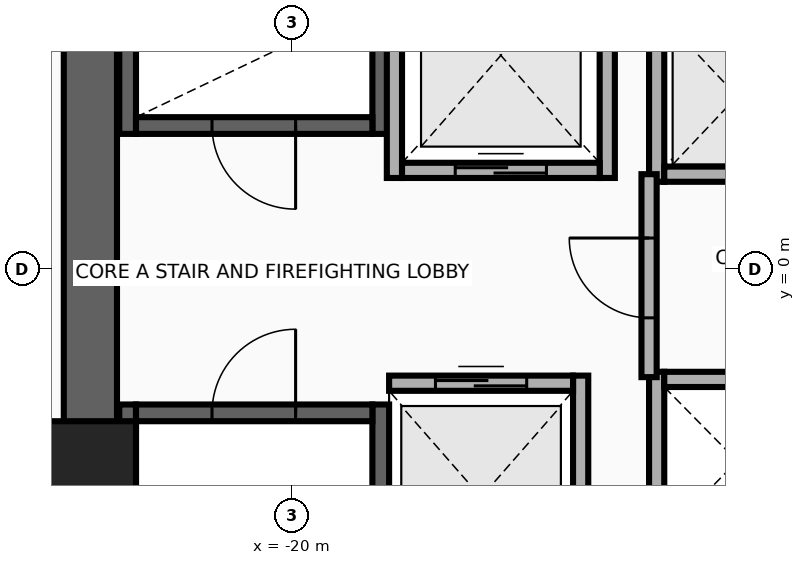
"""IFC4 building model, lengths in metres.
Left out: names, types, materials, properties, quantities, classifications, styles, units other than length and angle.
Written with IfcOpenShell. Run it as: python <this file> out.ifc"""

import sys

from ifc_helpers import new_model, si_unit, direction, frame, frame_2d, origin, origin_2d, place, context, subcontext, project, spatial, rectangle, extrude, source, transform, mapped, element, fill, save


model = new_model("IFC4")
c1 = context("Model", 3, precision=1e-05, world=origin(), true_north=direction((0.0, 1.0)))
c2 = subcontext(c1, "Body", "Model", "MODEL_VIEW")
j1 = project(units=[si_unit("LENGTHUNIT", "METRE"), si_unit("PLANEANGLEUNIT", "RADIAN")], contexts=[c1])
p1 = place(None, origin())
s1 = spatial("IfcSite", under=j1, at=p1, CompositionType="ELEMENT")
p2 = place(p1, origin())
s2 = spatial("IfcBuilding", under=s1, at=p2, CompositionType="ELEMENT")
p3 = place(p2, frame((0.0, 0.0, 127.9)))
s3 = spatial("IfcBuildingStorey", under=s2, at=p3, CompositionType="ELEMENT", Elevation=127.9)
for number, where, z_axis, x_axis in (
    (1, (-22.16, 1.78, 0.0), (0.0, 0.0, 1.0), (0.0, 1.0, 0.0)),
    (2, (-18.83, 1.78, 0.0), (0.0, 0.0, 1.0), (0.0, 1.0, 0.0)),
):
    element("IfcWall", number, at=place(p3, frame(where, z_axis=z_axis, x_axis=x_axis)), inside=s3, PredefinedType="SHEAR", context=c2, shape_type="SweptSolid", body=[
        extrude(rectangle(XDim=8.67, YDim=0.22, at=frame_2d((4.335, 0.0))), origin(), (0.0, 0.0, 1.0), 3.46),
    ])
p4 = place(p3, frame((-22.05, 1.89, 0.0), z_axis=(0.0, 0.0, 1.0), x_axis=(1.0, 0.0, 0.0)))
e3 = element("IfcWall", 3, at=p4, inside=s3, PredefinedType="SHEAR", context=c2, shape_type="SweptSolid", body=[
    extrude(rectangle(XDim=3.11, YDim=0.22, at=frame_2d((1.555, 0.0))), origin(), (0.0, 0.0, 1.0), 3.46),
])
p5 = place(p4, frame((1.0, 0.0, 0.0)))
e4 = element("IfcOpeningElement", 4, at=p5, cuts=e3, PredefinedType="OPENING", context=c2, shape_type="SweptSolid", body=[
    extrude(rectangle(XDim=1.1, YDim=2.15, at=frame_2d((0.55, 1.075))), frame((0.0, 0.125, 0.0), z_axis=(0.0, -1.0, 0.0), x_axis=(1.0, 0.0, 0.0)), (0.0, 0.0, 1.0), 0.25),
])
for number, where, z_axis, x_axis in (
    (5, (-22.16, -10.45, 0.0), (0.0, 0.0, 1.0), (0.0, 1.0, 0.0)),
    (6, (-18.83, -10.45, 0.0), (0.0, 0.0, 1.0), (0.0, 1.0, 0.0)),
):
    element("IfcWall", number, at=place(p3, frame(where, z_axis=z_axis, x_axis=x_axis)), inside=s3, PredefinedType="SHEAR", context=c2, shape_type="SweptSolid", body=[
        extrude(rectangle(XDim=8.67, YDim=0.22, at=frame_2d((4.335, 0.0))), origin(), (0.0, 0.0, 1.0), 3.46),
    ])
p6 = place(p3, frame((-22.05, -1.89, 0.0), z_axis=(0.0, 0.0, 1.0), x_axis=(1.0, 0.0, 0.0)))
e7 = element("IfcWall", 7, at=p6, inside=s3, PredefinedType="SHEAR", context=c2, shape_type="SweptSolid", body=[
    extrude(rectangle(XDim=3.11, YDim=0.22, at=frame_2d((1.555, 0.0))), origin(), (0.0, 0.0, 1.0), 3.46),
])
p7 = place(p6, frame((1.0, 0.0, 0.0)))
e8 = element("IfcOpeningElement", 8, at=p7, cuts=e7, PredefinedType="OPENING", context=c2, shape_type="SweptSolid", body=[
    extrude(rectangle(XDim=1.1, YDim=2.15, at=frame_2d((0.55, 1.075))), frame((0.0, 0.125, 0.0), z_axis=(0.0, -1.0, 0.0), x_axis=(1.0, 0.0, 0.0)), (0.0, 0.0, 1.0), 0.25),
])
p8 = place(p3, frame((-22.65, -11.15, 0.0), z_axis=(0.0, 0.0, 1.0), x_axis=(0.0, 1.0, 0.0)))
e9 = element("IfcWall", 9, at=p8, inside=s3, PredefinedType="SHEAR", context=c2, shape_type="SweptSolid", body=[
    extrude(rectangle(XDim=22.3, YDim=0.7, at=frame_2d((11.15, 0.0))), origin(), (0.0, 0.0, 1.0), 3.46),
])
m1 = source(origin(), c2, "Body", "SweptSolid", [
    extrude(rectangle(XDim=1.2, YDim=1.2, at=origin_2d()), origin(), (0.0, 0.0, 1.0), 3.7),
])
p9 = place(p3, frame((-22.65, -2.6, 0.0), z_axis=(0.0, 0.0, 1.0), x_axis=(1.0, 0.0, 0.0)))
e10 = element("IfcColumn", 10, at=p9, inside=s3, PredefinedType="COLUMN", context=c2, shape_type="MappedRepresentation", body=[
    mapped(m1, transform((0.0, 0.0, 0.0), x_axis=(1.0, 0.0, 0.0), y_axis=(0.0, 1.0, 0.0), z_axis=(0.0, 0.0, 1.0), scale=1.0)),
])
for number, where, z_axis, x_axis in (
    (11, (-18.65, 1.2, 0.0), (0.0, 0.0, 1.0), (0.0, 1.0, 0.0)),
    (12, (-15.85, 1.2, 0.0), (0.0, 0.0, 1.0), (0.0, 1.0, 0.0)),
):
    element("IfcWall", number, at=place(p3, frame(where, z_axis=z_axis, x_axis=x_axis)), inside=s3, PredefinedType="MOVABLE", context=c2, shape_type="SweptSolid", body=[
        extrude(rectangle(XDim=3.225, YDim=0.2, at=frame_2d((1.613, 0.0))), origin(), (0.0, 0.0, 1.0), 3.46),
    ])
p10 = place(p3, frame((-18.55, 1.3, 0.0), z_axis=(0.0, 0.0, 1.0), x_axis=(1.0, 0.0, 0.0)))
e13 = element("IfcWall", 13, at=p10, inside=s3, PredefinedType="MOVABLE", context=c2, shape_type="SweptSolid", body=[
    extrude(rectangle(XDim=2.6, YDim=0.2, at=frame_2d((1.3, 0.0))), origin(), (0.0, 0.0, 1.0), 3.46),
])
p11 = place(p10, frame((0.7, 0.0, 0.0)))
e14 = element("IfcOpeningElement", 14, at=p11, cuts=e13, PredefinedType="OPENING", context=c2, shape_type="SweptSolid", body=[
    extrude(rectangle(XDim=1.2, YDim=2.1, at=frame_2d((0.6, 1.05))), frame((0.0, 0.115, 0.0), z_axis=(0.0, -1.0, 0.0), x_axis=(1.0, 0.0, 0.0)), (0.0, 0.0, 1.0), 0.23),
])
p12 = place(p3, frame((-16.2, -4.6, 0.0), z_axis=(0.0, 0.0, 1.0), x_axis=(0.0, 1.0, 0.0)))
e15 = element("IfcWall", 15, at=p12, inside=s3, PredefinedType="MOVABLE", context=c2, shape_type="SweptSolid", body=[
    extrude(rectangle(XDim=3.2, YDim=0.2, at=frame_2d((1.6, 0.0))), origin(), (0.0, 0.0, 1.0), 3.46),
])
p13 = place(p3, frame((-18.72, -1.5, 0.0), z_axis=(0.0, 0.0, 1.0), x_axis=(1.0, 0.0, 0.0)))
e16 = element("IfcWall", 16, at=p13, inside=s3, PredefinedType="MOVABLE", context=c2, shape_type="SweptSolid", body=[
    extrude(rectangle(XDim=2.42, YDim=0.2, at=frame_2d((1.21, 0.0))), origin(), (0.0, 0.0, 1.0), 3.46),
])
p14 = place(p13, frame((0.61, 0.0, 0.0)))
e17 = element("IfcOpeningElement", 17, at=p14, cuts=e16, PredefinedType="OPENING", context=c2, shape_type="SweptSolid", body=[
    extrude(rectangle(XDim=1.2, YDim=2.1, at=frame_2d((0.6, 1.05))), frame((0.0, 0.115, 0.0), z_axis=(0.0, -1.0, 0.0), x_axis=(1.0, 0.0, 0.0)), (0.0, 0.0, 1.0), 0.23),
])
p15 = place(p3, frame((-15.2, 1.15, 0.0), z_axis=(0.0, 0.0, 1.0), x_axis=(0.0, 1.0, 0.0)))
e18 = element("IfcWall", 18, at=p15, inside=s3, PredefinedType="MOVABLE", context=c2, shape_type="SweptSolid", body=[
    extrude(rectangle(XDim=2.25, YDim=0.2, at=frame_2d((1.125, 0.0))), origin(), (0.0, 0.0, 1.0), 3.46),
])
p16 = place(p3, frame((-15.1, 1.25, 0.0), z_axis=(0.0, 0.0, 1.0), x_axis=(1.0, 0.0, 0.0)))
e19 = element("IfcWall", 19, at=p16, inside=s3, PredefinedType="MOVABLE", context=c2, shape_type="SweptSolid", body=[
    extrude(rectangle(XDim=1.92, YDim=0.2, at=frame_2d((0.96, 0.0))), origin(), (0.0, 0.0, 1.0), 3.46),
])
p17 = place(p3, frame((-15.2, -3.7, 0.0), z_axis=(0.0, 0.0, 1.0), x_axis=(0.0, 1.0, 0.0)))
e20 = element("IfcWall", 20, at=p17, inside=s3, PredefinedType="MOVABLE", context=c2, shape_type="SweptSolid", body=[
    extrude(rectangle(XDim=2.35, YDim=0.2, at=frame_2d((1.175, 0.0))), origin(), (0.0, 0.0, 1.0), 3.46),
])
p18 = place(p3, frame((-15.1, -1.45, 0.0), z_axis=(0.0, 0.0, 1.0), x_axis=(1.0, 0.0, 0.0)))
e21 = element("IfcWall", 21, at=p18, inside=s3, PredefinedType="MOVABLE", context=c2, shape_type="SweptSolid", body=[
    extrude(rectangle(XDim=1.92, YDim=0.2, at=frame_2d((0.96, 0.0))), origin(), (0.0, 0.0, 1.0), 3.46),
])
p19 = place(p3, frame((-15.3, -1.42, 0.0), z_axis=(0.0, 0.0, 1.0), x_axis=(0.0, 1.0, 0.0)))
e22 = element("IfcWall", 22, at=p19, inside=s3, PredefinedType="PARTITIONING", context=c2, shape_type="SweptSolid", body=[
    extrude(rectangle(XDim=2.67, YDim=0.2, at=frame_2d((1.335, 0.0))), origin(), (0.0, 0.0, 1.0), 3.46),
])
p20 = place(p19, frame((0.78, 0.0, 0.0)))
e23 = element("IfcOpeningElement", 23, at=p20, cuts=e22, PredefinedType="OPENING", context=c2, shape_type="SweptSolid", body=[
    extrude(rectangle(XDim=1.05, YDim=2.15, at=frame_2d((0.525, 1.075))), frame((0.0, 0.115, 0.0), z_axis=(0.0, -1.0, 0.0), x_axis=(1.0, 0.0, 0.0)), (0.0, 0.0, 1.0), 0.23),
])
p21 = place(p11, origin())
e24 = element("IfcDoor", 24, at=p21, inside=s3, OperationType="DOUBLE_DOOR_SLIDING", PredefinedType="DOOR", context=c2, shape_type="SweptSolid", body=[
    extrude(rectangle(XDim=1.2, YDim=2.1, at=frame_2d((0.6, 1.05))), frame((0.0, 0.025, 0.0), z_axis=(0.0, -1.0, 0.0), x_axis=(1.0, 0.0, 0.0)), (0.0, 0.0, 1.0), 0.05),
])
fill(e14, e24)
p22 = place(p14, origin())
e25 = element("IfcDoor", 25, at=p22, inside=s3, OperationType="DOUBLE_DOOR_SLIDING", PredefinedType="DOOR", context=c2, shape_type="SweptSolid", body=[
    extrude(rectangle(XDim=1.2, YDim=2.1, at=frame_2d((0.6, 1.05))), frame((0.0, 0.025, 0.0), z_axis=(0.0, -1.0, 0.0), x_axis=(1.0, 0.0, 0.0)), (0.0, 0.0, 1.0), 0.05),
])
fill(e17, e25)
p23 = place(p20, origin())
e26 = element("IfcDoor", 26, at=p23, inside=s3, OperationType="SINGLE_SWING_RIGHT", PredefinedType="DOOR", context=c2, shape_type="SweptSolid", body=[
    extrude(rectangle(XDim=1.05, YDim=2.15, at=frame_2d((0.525, 1.075))), frame((0.0, 0.025, 0.0), z_axis=(0.0, -1.0, 0.0), x_axis=(1.0, 0.0, 0.0)), (0.0, 0.0, 1.0), 0.05),
])
fill(e23, e26)
p24 = place(p5, frame((1.1, 0.0, 0.0), z_axis=(0.0, 0.0, 1.0), x_axis=(-1.0, 0.0, 0.0)))
e27 = element("IfcDoor", 27, at=p24, inside=s3, OperationType="SINGLE_SWING_LEFT", PredefinedType="DOOR", context=c2, shape_type="SweptSolid", body=[
    extrude(rectangle(XDim=1.1, YDim=2.15, at=frame_2d((0.55, 1.075))), frame((0.0, 0.025, 0.0), z_axis=(0.0, -1.0, 0.0), x_axis=(1.0, 0.0, 0.0)), (0.0, 0.0, 1.0), 0.05),
])
fill(e4, e27)
p25 = place(p7, origin())
e28 = element("IfcDoor", 28, at=p25, inside=s3, OperationType="SINGLE_SWING_RIGHT", PredefinedType="DOOR", context=c2, shape_type="SweptSolid", body=[
    extrude(rectangle(XDim=1.1, YDim=2.15, at=frame_2d((0.55, 1.075))), frame((0.0, 0.025, 0.0), z_axis=(0.0, -1.0, 0.0), x_axis=(1.0, 0.0, 0.0)), (0.0, 0.0, 1.0), 0.05),
])
fill(e8, e28)
save(model, sys.argv[1])
